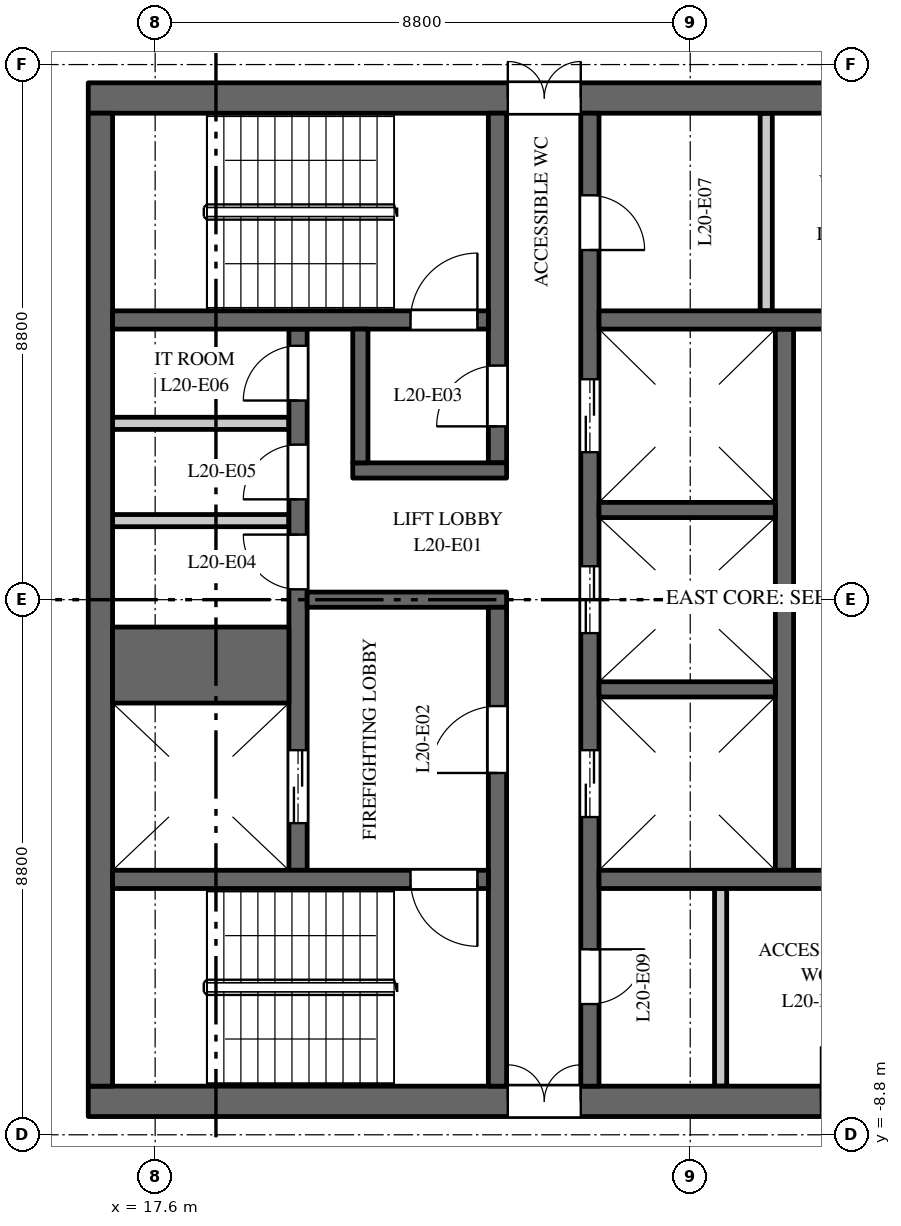
"""IFC4 building model, lengths in metres.
Left out: names, types, materials, properties, quantities, classifications, styles, units other than length and angle.
Written with IfcOpenShell. Run it as: python <this file> out.ifc"""

import sys

from ifc_helpers import new_model, si_unit, direction, frame, frame_2d, origin, place, context, subcontext, project, spatial, rectangle, extrude, element, fill, save


model = new_model("IFC4")
c1 = context("Model", 3, precision=1e-05, world=origin(), true_north=direction((0.0, 1.0)))
c2 = subcontext(c1, "Body", "Model", "MODEL_VIEW")
j1 = project(units=[si_unit("LENGTHUNIT", "METRE"), si_unit("PLANEANGLEUNIT", "RADIAN")], contexts=[c1])
p1 = place(None, origin())
s1 = spatial("IfcSite", under=j1, at=p1, CompositionType="ELEMENT")
p2 = place(p1, origin())
s2 = spatial("IfcBuilding", under=s1, at=p2, CompositionType="ELEMENT")
p3 = place(p2, frame((0.0, 0.0, 92.0)))
s3 = spatial("IfcBuildingStorey", under=s2, at=p3, CompositionType="ELEMENT", Elevation=92.0)
p4 = place(p3, frame((16.5, 8.25, 0.0), z_axis=(0.0, 0.0, 1.0), x_axis=(1.0, 0.0, 0.0)))
e1 = element("IfcWall", 1, at=p4, inside=s3, PredefinedType="SHEAR", context=c2, shape_type="SweptSolid", body=[
    extrude(rectangle(XDim=15.0, YDim=0.5, at=frame_2d((7.5, 0.0))), origin(), (0.0, 0.0, 1.0), 3.7),
])
p5 = place(p4, frame((6.9, 0.0, 0.0)))
e2 = element("IfcOpeningElement", 2, at=p5, cuts=e1, PredefinedType="OPENING", context=c2, shape_type="SweptSolid", body=[
    extrude(rectangle(XDim=1.2, YDim=2.1, at=frame_2d((0.6, 1.05))), frame((0.0, 0.26, 0.0), z_axis=(0.0, -1.0, 0.0), x_axis=(1.0, 0.0, 0.0)), (0.0, 0.0, 1.0), 0.52),
])
p6 = place(p4, frame((12.425, 0.0, 0.0)))
e3 = element("IfcOpeningElement", 3, at=p6, cuts=e1, PredefinedType="OPENING", context=c2, shape_type="SweptSolid", body=[
    extrude(rectangle(XDim=0.9, YDim=2.1, at=frame_2d((0.45, 1.05))), frame((0.0, 0.26, 0.0), z_axis=(0.0, -1.0, 0.0), x_axis=(1.0, 0.0, 0.0)), (0.0, 0.0, 1.0), 0.52),
])
p7 = place(p3, frame((16.5, -8.25, 0.0), z_axis=(0.0, 0.0, 1.0), x_axis=(1.0, 0.0, 0.0)))
e4 = element("IfcWall", 4, at=p7, inside=s3, PredefinedType="SHEAR", context=c2, shape_type="SweptSolid", body=[
    extrude(rectangle(XDim=15.0, YDim=0.5, at=frame_2d((7.5, 0.0))), origin(), (0.0, 0.0, 1.0), 3.7),
])
p8 = place(p7, frame((6.9, 0.0, 0.0)))
e5 = element("IfcOpeningElement", 5, at=p8, cuts=e4, PredefinedType="OPENING", context=c2, shape_type="SweptSolid", body=[
    extrude(rectangle(XDim=1.2, YDim=2.1, at=frame_2d((0.6, 1.05))), frame((0.0, 0.26, 0.0), z_axis=(0.0, -1.0, 0.0), x_axis=(1.0, 0.0, 0.0)), (0.0, 0.0, 1.0), 0.52),
])
p9 = place(p7, frame((12.05, 0.0, 0.0)))
e6 = element("IfcOpeningElement", 6, at=p9, cuts=e4, PredefinedType="OPENING", context=c2, shape_type="SweptSolid", body=[
    extrude(rectangle(XDim=0.9, YDim=2.1, at=frame_2d((0.45, 1.05))), frame((0.0, 0.26, 0.0), z_axis=(0.0, -1.0, 0.0), x_axis=(1.0, 0.0, 0.0)), (0.0, 0.0, 1.0), 0.52),
])
for number, where, z_axis, x_axis in (
    (7, (16.9, 1.3, 0.0), (0.0, 0.0, 1.0), (1.0, 0.0, 0.0)),
    (8, (16.9, 2.9, 0.0), (0.0, 0.0, 1.0), (1.0, 0.0, 0.0)),
):
    element("IfcWall", number, at=place(p3, frame(where, z_axis=z_axis, x_axis=x_axis)), inside=s3, PredefinedType="PARTITIONING", context=c2, shape_type="SweptSolid", body=[
        extrude(rectangle(XDim=2.9, YDim=0.2, at=frame_2d((1.45, 0.0))), origin(), (0.0, 0.0, 1.0), 3.7),
    ])
p10 = place(p3, frame((27.95, -4.45, 0.0), z_axis=(0.0, 0.0, 1.0), x_axis=(0.0, 1.0, 0.0)))
e9 = element("IfcWall", 9, at=p10, inside=s3, PredefinedType="SHEAR", context=c2, shape_type="SweptSolid", body=[
    extrude(rectangle(XDim=8.9, YDim=0.3, at=frame_2d((4.45, 0.0))), origin(), (0.0, 0.0, 1.0), 3.7),
])
p11 = place(p3, frame((19.95, -4.45, 0.0), z_axis=(0.0, 0.0, 1.0), x_axis=(0.0, 1.0, 0.0)))
e10 = element("IfcWall", 10, at=p11, inside=s3, PredefinedType="SHEAR", context=c2, shape_type="SweptSolid", body=[
    extrude(rectangle(XDim=8.9, YDim=0.3, at=frame_2d((4.45, 0.0))), origin(), (0.0, 0.0, 1.0), 3.7),
])
p12 = place(p11, frame((0.775, 0.0, 0.0)))
e11 = element("IfcOpeningElement", 11, at=p12, cuts=e10, PredefinedType="OPENING", context=c2, shape_type="SweptSolid", body=[
    extrude(rectangle(XDim=1.2, YDim=2.1, at=frame_2d((0.6, 1.05))), frame((0.0, 0.16, 0.0), z_axis=(0.0, -1.0, 0.0), x_axis=(1.0, 0.0, 0.0)), (0.0, 0.0, 1.0), 0.32),
])
p13 = place(p11, frame((4.62, 0.0, 0.0)))
e12 = element("IfcOpeningElement", 12, at=p13, cuts=e10, PredefinedType="OPENING", context=c2, shape_type="SweptSolid", body=[
    extrude(rectangle(XDim=0.9, YDim=2.1, at=frame_2d((0.45, 1.05))), frame((0.0, 0.16, 0.0), z_axis=(0.0, -1.0, 0.0), x_axis=(1.0, 0.0, 0.0)), (0.0, 0.0, 1.0), 0.32),
])
p14 = place(p11, frame((6.1, 0.0, 0.0)))
e13 = element("IfcOpeningElement", 13, at=p14, cuts=e10, PredefinedType="OPENING", context=c2, shape_type="SweptSolid", body=[
    extrude(rectangle(XDim=0.9, YDim=2.1, at=frame_2d((0.45, 1.05))), frame((0.0, 0.16, 0.0), z_axis=(0.0, -1.0, 0.0), x_axis=(1.0, 0.0, 0.0)), (0.0, 0.0, 1.0), 0.32),
])
p15 = place(p11, frame((7.725, 0.0, 0.0)))
e14 = element("IfcOpeningElement", 14, at=p15, cuts=e10, PredefinedType="OPENING", context=c2, shape_type="SweptSolid", body=[
    extrude(rectangle(XDim=0.9, YDim=2.1, at=frame_2d((0.45, 1.05))), frame((0.0, 0.16, 0.0), z_axis=(0.0, -1.0, 0.0), x_axis=(1.0, 0.0, 0.0)), (0.0, 0.0, 1.0), 0.32),
])
p16 = place(p3, frame((24.75, -8.0, 0.0), z_axis=(0.0, 0.0, 1.0), x_axis=(0.0, 1.0, 0.0)))
e15 = element("IfcWall", 15, at=p16, inside=s3, PredefinedType="SHEAR", context=c2, shape_type="SweptSolid", body=[
    extrude(rectangle(XDim=16.0, YDim=0.3, at=frame_2d((8.0, 0.0))), origin(), (0.0, 0.0, 1.0), 3.7),
])
p17 = place(p16, frame((4.425, 0.0, 0.0)))
e16 = element("IfcOpeningElement", 16, at=p17, cuts=e15, PredefinedType="OPENING", context=c2, shape_type="SweptSolid", body=[
    extrude(rectangle(XDim=1.1, YDim=2.1, at=frame_2d((0.55, 1.05))), frame((0.0, 0.16, 0.0), z_axis=(0.0, -1.0, 0.0), x_axis=(1.0, 0.0, 0.0)), (0.0, 0.0, 1.0), 0.32),
])
p18 = place(p16, frame((7.45, 0.0, 0.0)))
e17 = element("IfcOpeningElement", 17, at=p18, cuts=e15, PredefinedType="OPENING", context=c2, shape_type="SweptSolid", body=[
    extrude(rectangle(XDim=1.1, YDim=2.1, at=frame_2d((0.55, 1.05))), frame((0.0, 0.16, 0.0), z_axis=(0.0, -1.0, 0.0), x_axis=(1.0, 0.0, 0.0)), (0.0, 0.0, 1.0), 0.32),
])
p19 = place(p16, frame((10.425, 0.0, 0.0)))
e18 = element("IfcOpeningElement", 18, at=p19, cuts=e15, PredefinedType="OPENING", context=c2, shape_type="SweptSolid", body=[
    extrude(rectangle(XDim=1.2, YDim=2.1, at=frame_2d((0.6, 1.05))), frame((0.0, 0.16, 0.0), z_axis=(0.0, -1.0, 0.0), x_axis=(1.0, 0.0, 0.0)), (0.0, 0.0, 1.0), 0.32),
])
p20 = place(p16, frame((13.75, 0.0, 0.0)))
e19 = element("IfcOpeningElement", 19, at=p20, cuts=e15, PredefinedType="OPENING", context=c2, shape_type="SweptSolid", body=[
    extrude(rectangle(XDim=0.9, YDim=2.1, at=frame_2d((0.45, 1.05))), frame((0.0, 0.16, 0.0), z_axis=(0.0, -1.0, 0.0), x_axis=(1.0, 0.0, 0.0)), (0.0, 0.0, 1.0), 0.32),
])
p21 = place(p16, frame((1.35, 0.0, 0.0)))
e20 = element("IfcOpeningElement", 20, at=p21, cuts=e15, PredefinedType="OPENING", context=c2, shape_type="SweptSolid", body=[
    extrude(rectangle(XDim=0.9, YDim=2.1, at=frame_2d((0.45, 1.05))), frame((0.0, 0.16, 0.0), z_axis=(0.0, -1.0, 0.0), x_axis=(1.0, 0.0, 0.0)), (0.0, 0.0, 1.0), 0.32),
])
p22 = place(p3, frame((20.1, 0.0, 0.0), z_axis=(0.0, 0.0, 1.0), x_axis=(1.0, 0.0, 0.0)))
e21 = element("IfcWall", 21, at=p22, inside=s3, PredefinedType="SHEAR", context=c2, shape_type="SweptSolid", body=[
    extrude(rectangle(XDim=3.28, YDim=0.25, at=frame_2d((1.64, 0.0))), origin(), (0.0, 0.0, 1.0), 3.7),
])
p23 = place(p3, frame((16.7, -8.0, 0.0), z_axis=(0.0, 0.0, 1.0), x_axis=(0.0, 1.0, 0.0)))
e22 = element("IfcWall", 22, at=p23, inside=s3, PredefinedType="SHEAR", context=c2, shape_type="SweptSolid", body=[
    extrude(rectangle(XDim=16.0, YDim=0.4, at=frame_2d((8.0, 0.0))), origin(), (0.0, 0.0, 1.0), 3.7),
])
p24 = place(p3, frame((24.9, 4.6, 0.0), z_axis=(0.0, 0.0, 1.0), x_axis=(1.0, 0.0, 0.0)))
e23 = element("IfcWall", 23, at=p24, inside=s3, PredefinedType="SHEAR", context=c2, shape_type="SweptSolid", body=[
    extrude(rectangle(XDim=6.1, YDim=0.3, at=frame_2d((3.05, 0.0))), origin(), (0.0, 0.0, 1.0), 3.7),
])
p25 = place(p24, frame((4.2, 0.0, 0.0)))
e24 = element("IfcOpeningElement", 24, at=p25, cuts=e23, PredefinedType="OPENING", context=c2, shape_type="SweptSolid", body=[
    extrude(rectangle(XDim=0.9, YDim=2.1, at=frame_2d((0.45, 1.05))), frame((0.0, 0.16, 0.0), z_axis=(0.0, -1.0, 0.0), x_axis=(1.0, 0.0, 0.0)), (0.0, 0.0, 1.0), 0.32),
])
for number, where, z_axis, x_axis in (
    (25, (27.65, 4.75, 0.0), (0.0, 0.0, 1.0), (0.0, 1.0, 0.0)),
    (26, (26.9, -8.0, 0.0), (0.0, 0.0, 1.0), (0.0, 1.0, 0.0)),
):
    element("IfcWall", number, at=place(p3, frame(where, z_axis=z_axis, x_axis=x_axis)), inside=s3, PredefinedType="PARTITIONING", context=c2, shape_type="SweptSolid", body=[
        extrude(rectangle(XDim=3.25, YDim=0.2, at=frame_2d((1.625, 0.0))), origin(), (0.0, 0.0, 1.0), 3.7),
    ])
p26 = place(p3, frame((24.9, -4.6, 0.0), z_axis=(0.0, 0.0, 1.0), x_axis=(1.0, 0.0, 0.0)))
e27 = element("IfcWall", 27, at=p26, inside=s3, PredefinedType="SHEAR", context=c2, shape_type="SweptSolid", body=[
    extrude(rectangle(XDim=6.1, YDim=0.3, at=frame_2d((3.05, 0.0))), origin(), (0.0, 0.0, 1.0), 3.7),
])
p27 = place(p3, frame((16.9, -1.075, 0.0), z_axis=(0.0, 0.0, 1.0), x_axis=(1.0, 0.0, 0.0)))
e28 = element("IfcWall", 28, at=p27, inside=s3, PredefinedType="SHEAR", context=c2, shape_type="SweptSolid", body=[
    extrude(rectangle(XDim=2.9, YDim=1.25, at=frame_2d((1.45, 0.0))), origin(), (0.0, 0.0, 1.0), 3.7),
])
for number, where, z_axis, x_axis in (
    (29, (24.9, -1.475, 0.0), (0.0, 0.0, 1.0), (1.0, 0.0, 0.0)),
    (30, (24.9, 1.475, 0.0), (0.0, 0.0, 1.0), (1.0, 0.0, 0.0)),
):
    element("IfcWall", number, at=place(p3, frame(where, z_axis=z_axis, x_axis=x_axis)), inside=s3, PredefinedType="SHEAR", context=c2, shape_type="SweptSolid", body=[
        extrude(rectangle(XDim=2.9, YDim=0.25, at=frame_2d((1.45, 0.0))), origin(), (0.0, 0.0, 1.0), 3.7),
    ])
p28 = place(p3, frame((23.23, 2.25, 0.0), z_axis=(0.0, 0.0, 1.0), x_axis=(0.0, 1.0, 0.0)))
e31 = element("IfcWall", 31, at=p28, inside=s3, PredefinedType="SHEAR", context=c2, shape_type="SweptSolid", body=[
    extrude(rectangle(XDim=5.75, YDim=0.3, at=frame_2d((2.875, 0.0))), origin(), (0.0, 0.0, 1.0), 3.7),
])
p29 = place(p28, frame((0.6, 0.0, 0.0)))
e32 = element("IfcOpeningElement", 32, at=p29, cuts=e31, PredefinedType="OPENING", context=c2, shape_type="SweptSolid", body=[
    extrude(rectangle(XDim=1.0, YDim=2.1, at=frame_2d((0.5, 1.05))), frame((0.0, 0.16, 0.0), z_axis=(0.0, -1.0, 0.0), x_axis=(1.0, 0.0, 0.0)), (0.0, 0.0, 1.0), 0.32),
])
p30 = place(p3, frame((23.23, -8.0, 0.0), z_axis=(0.0, 0.0, 1.0), x_axis=(0.0, 1.0, 0.0)))
e33 = element("IfcWall", 33, at=p30, inside=s3, PredefinedType="SHEAR", context=c2, shape_type="SweptSolid", body=[
    extrude(rectangle(XDim=7.875, YDim=0.3, at=frame_2d((3.938, 0.0))), origin(), (0.0, 0.0, 1.0), 3.7),
])
p31 = place(p30, frame((5.15, 0.0, 0.0)))
e34 = element("IfcOpeningElement", 34, at=p31, cuts=e33, PredefinedType="OPENING", context=c2, shape_type="SweptSolid", body=[
    extrude(rectangle(XDim=1.1, YDim=2.1, at=frame_2d((0.55, 1.05))), frame((0.0, 0.16, 0.0), z_axis=(0.0, -1.0, 0.0), x_axis=(1.0, 0.0, 0.0)), (0.0, 0.0, 1.0), 0.32),
])
p32 = place(p3, frame((16.9, 4.6, 0.0), z_axis=(0.0, 0.0, 1.0), x_axis=(1.0, 0.0, 0.0)))
e35 = element("IfcWall", 35, at=p32, inside=s3, PredefinedType="SHEAR", context=c2, shape_type="SweptSolid", body=[
    extrude(rectangle(XDim=6.18, YDim=0.3, at=frame_2d((3.09, 0.0))), origin(), (0.0, 0.0, 1.0), 3.7),
])
p33 = place(p32, frame((4.9, 0.0, 0.0)))
e36 = element("IfcOpeningElement", 36, at=p33, cuts=e35, PredefinedType="OPENING", context=c2, shape_type="SweptSolid", body=[
    extrude(rectangle(XDim=1.1, YDim=2.1, at=frame_2d((0.55, 1.05))), frame((0.0, 0.16, 0.0), z_axis=(0.0, -1.0, 0.0), x_axis=(1.0, 0.0, 0.0)), (0.0, 0.0, 1.0), 0.32),
])
p34 = place(p3, frame((16.9, -4.6, 0.0), z_axis=(0.0, 0.0, 1.0), x_axis=(1.0, 0.0, 0.0)))
e37 = element("IfcWall", 37, at=p34, inside=s3, PredefinedType="SHEAR", context=c2, shape_type="SweptSolid", body=[
    extrude(rectangle(XDim=6.18, YDim=0.3, at=frame_2d((3.09, 0.0))), origin(), (0.0, 0.0, 1.0), 3.7),
])
p35 = place(p34, frame((4.9, 0.0, 0.0)))
e38 = element("IfcOpeningElement", 38, at=p35, cuts=e37, PredefinedType="OPENING", context=c2, shape_type="SweptSolid", body=[
    extrude(rectangle(XDim=1.1, YDim=2.1, at=frame_2d((0.55, 1.05))), frame((0.0, 0.16, 0.0), z_axis=(0.0, -1.0, 0.0), x_axis=(1.0, 0.0, 0.0)), (0.0, 0.0, 1.0), 0.32),
])
p36 = place(p3, frame((20.85, 2.125, 0.0), z_axis=(0.0, 0.0, 1.0), x_axis=(1.0, 0.0, 0.0)))
e39 = element("IfcWall", 39, at=p36, inside=s3, PredefinedType="SHEAR", context=c2, shape_type="SweptSolid", body=[
    extrude(rectangle(XDim=2.53, YDim=0.25, at=frame_2d((1.265, 0.0))), origin(), (0.0, 0.0, 1.0), 3.7),
])
p37 = place(p3, frame((20.975, 2.25, 0.0), z_axis=(0.0, 0.0, 1.0), x_axis=(0.0, 1.0, 0.0)))
e40 = element("IfcWall", 40, at=p37, inside=s3, PredefinedType="SHEAR", context=c2, shape_type="SweptSolid", body=[
    extrude(rectangle(XDim=2.2, YDim=0.25, at=frame_2d((1.1, 0.0))), origin(), (0.0, 0.0, 1.0), 3.7),
])
p38 = place(p12, origin())
e41 = element("IfcDoor", 41, at=p38, inside=s3, OperationType="DOUBLE_DOOR_SLIDING", PredefinedType="DOOR", context=c2, shape_type="SweptSolid", body=[
    extrude(rectangle(XDim=1.2, YDim=2.1, at=frame_2d((0.6, 1.05))), frame((0.0, 0.025, 0.0), z_axis=(0.0, -1.0, 0.0), x_axis=(1.0, 0.0, 0.0)), (0.0, 0.0, 1.0), 0.05),
])
fill(e11, e41)
p39 = place(p17, origin())
e42 = element("IfcDoor", 42, at=p39, inside=s3, OperationType="DOUBLE_DOOR_SLIDING", PredefinedType="DOOR", context=c2, shape_type="SweptSolid", body=[
    extrude(rectangle(XDim=1.1, YDim=2.1, at=frame_2d((0.55, 1.05))), frame((0.0, 0.025, 0.0), z_axis=(0.0, -1.0, 0.0), x_axis=(1.0, 0.0, 0.0)), (0.0, 0.0, 1.0), 0.05),
])
fill(e16, e42)
p40 = place(p18, origin())
e43 = element("IfcDoor", 43, at=p40, inside=s3, OperationType="DOUBLE_DOOR_SLIDING", PredefinedType="DOOR", context=c2, shape_type="SweptSolid", body=[
    extrude(rectangle(XDim=1.1, YDim=2.1, at=frame_2d((0.55, 1.05))), frame((0.0, 0.025, 0.0), z_axis=(0.0, -1.0, 0.0), x_axis=(1.0, 0.0, 0.0)), (0.0, 0.0, 1.0), 0.05),
])
fill(e17, e43)
p41 = place(p19, origin())
e44 = element("IfcDoor", 44, at=p41, inside=s3, OperationType="DOUBLE_DOOR_SLIDING", PredefinedType="DOOR", context=c2, shape_type="SweptSolid", body=[
    extrude(rectangle(XDim=1.2, YDim=2.1, at=frame_2d((0.6, 1.05))), frame((0.0, 0.025, 0.0), z_axis=(0.0, -1.0, 0.0), x_axis=(1.0, 0.0, 0.0)), (0.0, 0.0, 1.0), 0.05),
])
fill(e18, e44)
p42 = place(p33, origin())
e45 = element("IfcDoor", 45, at=p42, inside=s3, OperationType="SINGLE_SWING_LEFT", PredefinedType="DOOR", context=c2, shape_type="SweptSolid", body=[
    extrude(rectangle(XDim=1.1, YDim=2.1, at=frame_2d((0.55, 1.05))), frame((0.0, 0.025, 0.0), z_axis=(0.0, -1.0, 0.0), x_axis=(1.0, 0.0, 0.0)), (0.0, 0.0, 1.0), 0.05),
])
fill(e36, e45)
p43 = place(p35, origin())
e46 = element("IfcDoor", 46, at=p43, inside=s3, OperationType="SINGLE_SWING_RIGHT", PredefinedType="DOOR", context=c2, shape_type="SweptSolid", body=[
    extrude(rectangle(XDim=1.1, YDim=2.1, at=frame_2d((0.55, 1.05))), frame((0.0, 0.025, 0.0), z_axis=(0.0, -1.0, 0.0), x_axis=(1.0, 0.0, 0.0)), (0.0, 0.0, 1.0), 0.05),
])
fill(e38, e46)
p44 = place(p31, origin())
e47 = element("IfcDoor", 47, at=p44, inside=s3, OperationType="SINGLE_SWING_RIGHT", PredefinedType="DOOR", context=c2, shape_type="SweptSolid", body=[
    extrude(rectangle(XDim=1.1, YDim=2.1, at=frame_2d((0.55, 1.05))), frame((0.0, 0.025, 0.0), z_axis=(0.0, -1.0, 0.0), x_axis=(1.0, 0.0, 0.0)), (0.0, 0.0, 1.0), 0.05),
])
fill(e34, e47)
p45 = place(p29, origin())
e48 = element("IfcDoor", 48, at=p45, inside=s3, OperationType="SINGLE_SWING_RIGHT", PredefinedType="DOOR", context=c2, shape_type="SweptSolid", body=[
    extrude(rectangle(XDim=1.0, YDim=2.1, at=frame_2d((0.5, 1.05))), frame((0.0, 0.025, 0.0), z_axis=(0.0, -1.0, 0.0), x_axis=(1.0, 0.0, 0.0)), (0.0, 0.0, 1.0), 0.05),
])
fill(e32, e48)
p46 = place(p5, origin())
e49 = element("IfcDoor", 49, at=p46, inside=s3, OperationType="DOUBLE_DOOR_DOUBLE_SWING", PredefinedType="DOOR", context=c2, shape_type="SweptSolid", body=[
    extrude(rectangle(XDim=1.2, YDim=2.1, at=frame_2d((0.6, 1.05))), frame((0.0, 0.025, 0.0), z_axis=(0.0, -1.0, 0.0), x_axis=(1.0, 0.0, 0.0)), (0.0, 0.0, 1.0), 0.05),
])
fill(e2, e49)
p47 = place(p8, origin())
e50 = element("IfcDoor", 50, at=p47, inside=s3, OperationType="DOUBLE_DOOR_DOUBLE_SWING", PredefinedType="DOOR", context=c2, shape_type="SweptSolid", body=[
    extrude(rectangle(XDim=1.2, YDim=2.1, at=frame_2d((0.6, 1.05))), frame((0.0, 0.025, 0.0), z_axis=(0.0, -1.0, 0.0), x_axis=(1.0, 0.0, 0.0)), (0.0, 0.0, 1.0), 0.05),
])
fill(e5, e50)
p48 = place(p13, origin())
e51 = element("IfcDoor", 51, at=p48, inside=s3, OperationType="SINGLE_SWING_LEFT", PredefinedType="DOOR", context=c2, shape_type="SweptSolid", body=[
    extrude(rectangle(XDim=0.9, YDim=2.1, at=frame_2d((0.45, 1.05))), frame((0.0, 0.025, 0.0), z_axis=(0.0, -1.0, 0.0), x_axis=(1.0, 0.0, 0.0)), (0.0, 0.0, 1.0), 0.05),
])
fill(e12, e51)
p49 = place(p14, origin())
e52 = element("IfcDoor", 52, at=p49, inside=s3, OperationType="SINGLE_SWING_RIGHT", PredefinedType="DOOR", context=c2, shape_type="SweptSolid", body=[
    extrude(rectangle(XDim=0.9, YDim=2.1, at=frame_2d((0.45, 1.05))), frame((0.0, 0.025, 0.0), z_axis=(0.0, -1.0, 0.0), x_axis=(1.0, 0.0, 0.0)), (0.0, 0.0, 1.0), 0.05),
])
fill(e13, e52)
p50 = place(p15, origin())
e53 = element("IfcDoor", 53, at=p50, inside=s3, OperationType="SINGLE_SWING_RIGHT", PredefinedType="DOOR", context=c2, shape_type="SweptSolid", body=[
    extrude(rectangle(XDim=0.9, YDim=2.1, at=frame_2d((0.45, 1.05))), frame((0.0, 0.025, 0.0), z_axis=(0.0, -1.0, 0.0), x_axis=(1.0, 0.0, 0.0)), (0.0, 0.0, 1.0), 0.05),
])
fill(e14, e53)
p51 = place(p20, origin())
e54 = element("IfcDoor", 54, at=p51, inside=s3, OperationType="SINGLE_SWING_LEFT", PredefinedType="DOOR", context=c2, shape_type="SweptSolid", body=[
    extrude(rectangle(XDim=0.9, YDim=2.1, at=frame_2d((0.45, 1.05))), frame((0.0, 0.025, 0.0), z_axis=(0.0, -1.0, 0.0), x_axis=(1.0, 0.0, 0.0)), (0.0, 0.0, 1.0), 0.05),
])
fill(e19, e54)
p52 = place(p21, origin())
e55 = element("IfcDoor", 55, at=p52, inside=s3, OperationType="SINGLE_SWING_RIGHT", PredefinedType="DOOR", context=c2, shape_type="SweptSolid", body=[
    extrude(rectangle(XDim=0.9, YDim=2.1, at=frame_2d((0.45, 1.05))), frame((0.0, 0.025, 0.0), z_axis=(0.0, -1.0, 0.0), x_axis=(1.0, 0.0, 0.0)), (0.0, 0.0, 1.0), 0.05),
])
fill(e20, e55)
save(model, sys.argv[1])
